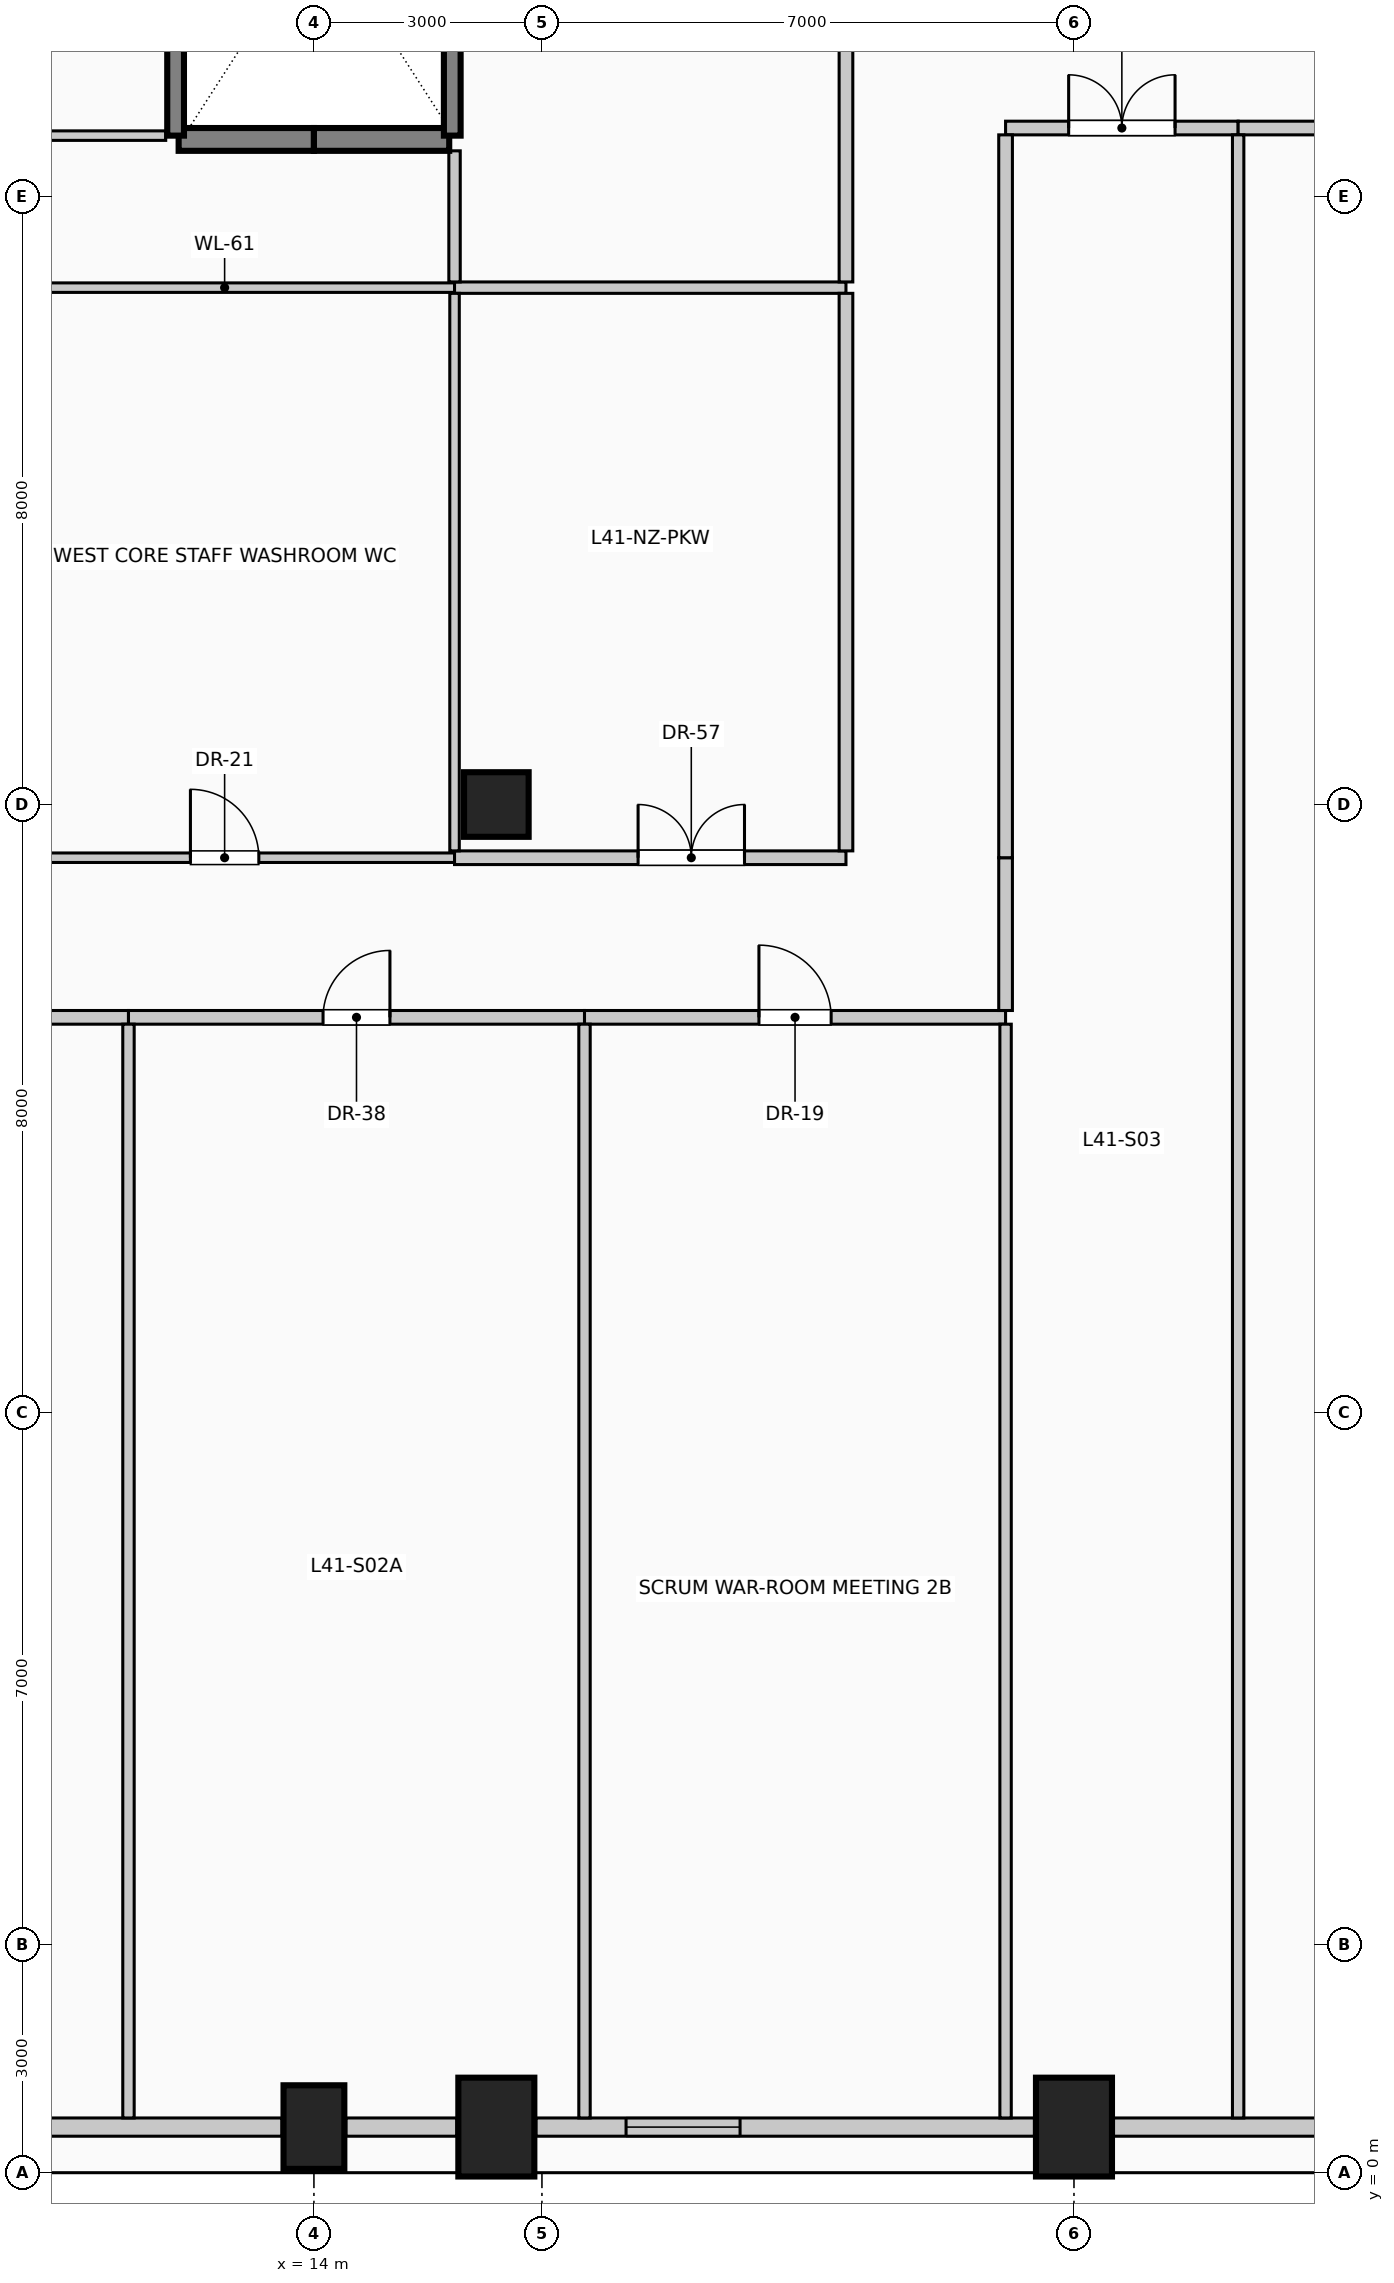
"""IFC4 building model, lengths in metres.
Left out: names, types, materials, properties, quantities, classifications, styles, units other than length and angle.
Written with IfcOpenShell. Run it as: python <this file> out.ifc"""

import sys

from ifc_helpers import new_model, si_unit, direction, frame, frame_2d, origin, origin_2d, place, context, subcontext, project, spatial, rectangle, circle, extrude, element, fill, save


model = new_model("IFC4")
c1 = context("Model", 3, precision=1e-05, world=origin(), true_north=direction((0.0, 1.0)))
c2 = subcontext(c1, "Body", "Model", "MODEL_VIEW")
j1 = project(units=[si_unit("LENGTHUNIT", "METRE"), si_unit("PLANEANGLEUNIT", "RADIAN")], contexts=[c1])
p1 = place(None, origin())
s1 = spatial("IfcSite", under=j1, at=p1, CompositionType="ELEMENT")
p2 = place(p1, origin())
s2 = spatial("IfcBuilding", under=s1, at=p2, CompositionType="ELEMENT")
p3 = place(p2, frame((0.0, 0.0, 170.6)))
s3 = spatial("IfcBuildingStorey", under=s2, at=p3, CompositionType="ELEMENT", Elevation=170.6)
p4 = place(p3, frame((14.0, 0.6, 0.0), z_axis=(0.0, 0.0, 1.0), x_axis=(1.0, 0.0, 0.0)))
e1 = element("IfcColumn", 1, at=p4, inside=s3, PredefinedType="COLUMN", context=c2, shape_type="SweptSolid", body=[
    extrude(rectangle(XDim=0.8, YDim=1.1, at=origin_2d()), origin(), (0.0, 0.0, 1.0), 4.0),
])
for number, where, z_axis, x_axis in (
    (2, (16.4, 0.6, 0.0), (0.0, 0.0, 1.0), (1.0, 0.0, 0.0)),
    (3, (24.0, 0.6, 0.0), (0.0, 0.0, 1.0), (1.0, 0.0, 0.0)),
):
    element("IfcColumn", number, at=place(p3, frame(where, z_axis=z_axis, x_axis=x_axis)), inside=s3, PredefinedType="COLUMN", context=c2, shape_type="SweptSolid", body=[
        extrude(rectangle(XDim=1.0, YDim=1.3, at=origin_2d()), origin(), (0.0, 0.0, 1.0), 4.0),
    ])
p5 = place(p3, frame((16.4, 18.0, 0.0), z_axis=(0.0, 0.0, 1.0), x_axis=(1.0, 0.0, 0.0)))
e4 = element("IfcColumn", 4, at=p5, inside=s3, PredefinedType="COLUMN", context=c2, shape_type="SweptSolid", body=[
    extrude(circle(Radius=0.425, at=origin_2d()), origin(), (0.0, 0.0, 1.0), 4.0),
])
p6 = place(p3, frame((13.58, 0.6, 0.0), z_axis=(0.0, 0.0, 1.0), x_axis=(-1.0, 0.0, 0.0)))
e5 = element("IfcWall", 5, at=p6, inside=s3, PredefinedType="SOLIDWALL", context=c2, shape_type="SweptSolid", body=[
    extrude(rectangle(XDim=4.66, YDim=0.24, at=frame_2d((2.33, 0.0))), origin(), (0.0, 0.0, 1.0), 2.975),
])
p7 = place(p3, frame((15.88, 0.6, 0.0), z_axis=(0.0, 0.0, 1.0), x_axis=(-1.0, 0.0, 0.0)))
e6 = element("IfcWall", 6, at=p7, inside=s3, PredefinedType="SOLIDWALL", context=c2, shape_type="SweptSolid", body=[
    extrude(rectangle(XDim=1.46, YDim=0.24, at=frame_2d((0.73, 0.0))), origin(), (0.0, 0.0, 1.0), 2.975),
])
p8 = place(p3, frame((23.48, 0.6, 0.0), z_axis=(0.0, 0.0, 1.0), x_axis=(-1.0, 0.0, 0.0)))
e7 = element("IfcWall", 7, at=p8, inside=s3, PredefinedType="SOLIDWALL", context=c2, shape_type="SweptSolid", body=[
    extrude(rectangle(XDim=6.56, YDim=0.24, at=frame_2d((3.28, 0.0))), origin(), (0.0, 0.0, 1.0), 2.975),
])
p9 = place(p8, frame((3.873, 0.0, 0.42)))
e8 = element("IfcOpeningElement", 8, at=p9, cuts=e7, PredefinedType="OPENING", context=c2, shape_type="SweptSolid", body=[
    extrude(rectangle(XDim=1.5, YDim=2.2, at=frame_2d((0.75, 1.1))), frame((0.0, 0.13, 0.0), z_axis=(0.0, -1.0, 0.0), x_axis=(1.0, 0.0, 0.0)), (0.0, 0.0, 1.0), 0.26),
])
p10 = place(p3, frame((28.58, 0.6, 0.0), z_axis=(0.0, 0.0, 1.0), x_axis=(-1.0, 0.0, 0.0)))
e9 = element("IfcWall", 9, at=p10, inside=s3, PredefinedType="SOLIDWALL", context=c2, shape_type="SweptSolid", body=[
    extrude(rectangle(XDim=4.06, YDim=0.24, at=frame_2d((2.03, 0.0))), origin(), (0.0, 0.0, 1.0), 2.975),
])
for number, where, z_axis, x_axis in (
    (10, (14.0, 26.75, 0.0), (0.0, 0.0, 1.0), (-1.0, 0.0, 0.0)),
    (11, (15.78, 26.75, 0.0), (0.0, 0.0, 1.0), (-1.0, 0.0, 0.0)),
):
    element("IfcWall", number, at=place(p3, frame(where, z_axis=z_axis, x_axis=x_axis)), inside=s3, PredefinedType="SOLIDWALL", context=c2, shape_type="SweptSolid", body=[
        extrude(rectangle(XDim=1.78, YDim=0.3, at=frame_2d((0.89, 0.0))), origin(), (0.0, 0.0, 1.0), 4.0),
    ])
for number, where, z_axis, x_axis in (
    (12, (12.18, 26.8, 0.0), (0.0, 0.0, 1.0), (0.0, 1.0, 0.0)),
    (13, (15.82, 26.8, 0.0), (0.0, 0.0, 1.0), (0.0, 1.0, 0.0)),
):
    element("IfcWall", number, at=place(p3, frame(where, z_axis=z_axis, x_axis=x_axis)), inside=s3, PredefinedType="SOLIDWALL", context=c2, shape_type="SweptSolid", body=[
        extrude(rectangle(XDim=5.45, YDim=0.22, at=frame_2d((2.725, 0.0))), origin(), (0.0, 0.0, 1.0), 4.0),
    ])
p11 = place(p3, frame((0.72, 15.2, 0.0), z_axis=(0.0, 0.0, 1.0), x_axis=(1.0, 0.0, 0.0)))
e14 = element("IfcWall", 14, at=p11, inside=s3, PredefinedType="PARTITIONING", context=c2, shape_type="SweptSolid", body=[
    extrude(rectangle(XDim=10.84, YDim=0.18, at=frame_2d((5.42, 0.0))), origin(), (0.0, 0.0, 1.0), 3.725),
])
p12 = place(p11, frame((4.945, 0.0, 0.0)))
e15 = element("IfcOpeningElement", 15, at=p12, cuts=e14, PredefinedType="OPENING", context=c2, shape_type="SweptSolid", body=[
    extrude(rectangle(XDim=0.95, YDim=2.15, at=frame_2d((0.475, 1.075))), frame((0.0, 0.1, 0.0), z_axis=(0.0, -1.0, 0.0), x_axis=(1.0, 0.0, 0.0)), (0.0, 0.0, 1.0), 0.2),
])
p13 = place(p3, frame((11.56, 15.2, 0.0), z_axis=(0.0, 0.0, 1.0), x_axis=(1.0, 0.0, 0.0)))
e16 = element("IfcWall", 16, at=p13, inside=s3, PredefinedType="PARTITIONING", context=c2, shape_type="SweptSolid", body=[
    extrude(rectangle(XDim=6.0, YDim=0.18, at=frame_2d((3.0, 0.0))), origin(), (0.0, 0.0, 1.0), 3.725),
])
p14 = place(p13, frame((2.56, 0.0, 0.0)))
e17 = element("IfcOpeningElement", 17, at=p14, cuts=e16, PredefinedType="OPENING", context=c2, shape_type="SweptSolid", body=[
    extrude(rectangle(XDim=0.88, YDim=2.1, at=frame_2d((0.44, 1.05))), frame((0.0, 0.1, 0.0), z_axis=(0.0, -1.0, 0.0), x_axis=(1.0, 0.0, 0.0)), (0.0, 0.0, 1.0), 0.2),
])
p15 = place(p3, frame((17.56, 15.2, 0.0), z_axis=(0.0, 0.0, 1.0), x_axis=(1.0, 0.0, 0.0)))
e18 = element("IfcWall", 18, at=p15, inside=s3, PredefinedType="PARTITIONING", context=c2, shape_type="SweptSolid", body=[
    extrude(rectangle(XDim=5.54, YDim=0.18, at=frame_2d((2.77, 0.0))), origin(), (0.0, 0.0, 1.0), 3.725),
])
p16 = place(p15, frame((2.295, 0.0, 0.0)))
e19 = element("IfcOpeningElement", 19, at=p16, cuts=e18, PredefinedType="OPENING", context=c2, shape_type="SweptSolid", body=[
    extrude(rectangle(XDim=0.95, YDim=2.15, at=frame_2d((0.475, 1.075))), frame((0.0, 0.1, 0.0), z_axis=(0.0, -1.0, 0.0), x_axis=(1.0, 0.0, 0.0)), (0.0, 0.0, 1.0), 0.2),
])
p17 = place(p3, frame((9.8, 17.3, 0.0), z_axis=(0.0, 0.0, 1.0), x_axis=(1.0, 0.0, 0.0)))
e20 = element("IfcWall", 20, at=p17, inside=s3, PredefinedType="PARTITIONING", context=c2, shape_type="SweptSolid", body=[
    extrude(rectangle(XDim=6.05, YDim=0.125, at=frame_2d((3.025, 0.0))), origin(), (0.0, 0.0, 1.0), 3.725),
])
p18 = place(p17, frame((2.575, 0.0, 0.0)))
e21 = element("IfcOpeningElement", 21, at=p18, cuts=e20, PredefinedType="OPENING", context=c2, shape_type="SweptSolid", body=[
    extrude(rectangle(XDim=0.9, YDim=2.1, at=frame_2d((0.45, 1.05))), frame((0.0, 0.073, 0.0), z_axis=(0.0, -1.0, 0.0), x_axis=(1.0, 0.0, 0.0)), (0.0, 0.0, 1.0), 0.145),
])
p19 = place(p3, frame((15.85, 17.3, 0.0), z_axis=(0.0, 0.0, 1.0), x_axis=(1.0, 0.0, 0.0)))
e22 = element("IfcWall", 22, at=p19, inside=s3, PredefinedType="PARTITIONING", context=c2, shape_type="SweptSolid", body=[
    extrude(rectangle(XDim=5.15, YDim=0.18, at=frame_2d((2.575, 0.0))), origin(), (0.0, 0.0, 1.0), 3.725),
])
p20 = place(p19, frame((2.415, 0.0, 0.0)))
e23 = element("IfcOpeningElement", 23, at=p20, cuts=e22, PredefinedType="OPENING", context=c2, shape_type="SweptSolid", body=[
    extrude(rectangle(XDim=1.4, YDim=2.2, at=frame_2d((0.7, 1.1))), frame((0.0, 0.1, 0.0), z_axis=(0.0, -1.0, 0.0), x_axis=(1.0, 0.0, 0.0)), (0.0, 0.0, 1.0), 0.2),
])
p21 = place(p3, frame((9.8, 24.8, 0.0), z_axis=(0.0, 0.0, 1.0), x_axis=(1.0, 0.0, 0.0)))
e24 = element("IfcWall", 24, at=p21, inside=s3, PredefinedType="PARTITIONING", context=c2, shape_type="SweptSolid", body=[
    extrude(rectangle(XDim=6.05, YDim=0.125, at=frame_2d((3.025, 0.0))), origin(), (0.0, 0.0, 1.0), 3.725),
])
p22 = place(p3, frame((15.85, 24.8, 0.0), z_axis=(0.0, 0.0, 1.0), x_axis=(1.0, 0.0, 0.0)))
e25 = element("IfcWall", 25, at=p22, inside=s3, PredefinedType="PARTITIONING", context=c2, shape_type="SweptSolid", body=[
    extrude(rectangle(XDim=5.15, YDim=0.15, at=frame_2d((2.575, 0.0))), origin(), (0.0, 0.0, 1.0), 3.725),
])
p23 = place(p3, frame((7.89, 26.8, 0.0), z_axis=(0.0, 0.0, 1.0), x_axis=(1.0, 0.0, 0.0)))
e26 = element("IfcWall", 26, at=p23, inside=s3, PredefinedType="PARTITIONING", context=c2, shape_type="SweptSolid", body=[
    extrude(rectangle(XDim=4.16, YDim=0.125, at=frame_2d((2.08, 0.0))), origin(), (0.0, 0.0, 1.0), 3.725),
])
p24 = place(p23, frame((1.62, 0.0, 0.0)))
e27 = element("IfcOpeningElement", 27, at=p24, cuts=e26, PredefinedType="OPENING", context=c2, shape_type="SweptSolid", body=[
    extrude(rectangle(XDim=0.92, YDim=2.1, at=frame_2d((0.46, 1.05))), frame((0.0, 0.073, 0.0), z_axis=(0.0, -1.0, 0.0), x_axis=(1.0, 0.0, 0.0)), (0.0, 0.0, 1.0), 0.145),
])
p25 = place(p3, frame((23.1, 26.9, 0.0), z_axis=(0.0, 0.0, 1.0), x_axis=(1.0, 0.0, 0.0)))
e28 = element("IfcWall", 28, at=p25, inside=s3, PredefinedType="PARTITIONING", context=c2, shape_type="SweptSolid", body=[
    extrude(rectangle(XDim=3.06, YDim=0.18, at=frame_2d((1.53, 0.0))), origin(), (0.0, 0.0, 1.0), 3.725),
])
p26 = place(p25, frame((0.83, 0.0, 0.0)))
e29 = element("IfcOpeningElement", 29, at=p26, cuts=e28, PredefinedType="OPENING", context=c2, shape_type="SweptSolid", body=[
    extrude(rectangle(XDim=1.4, YDim=2.2, at=frame_2d((0.7, 1.1))), frame((0.0, 0.1, 0.0), z_axis=(0.0, -1.0, 0.0), x_axis=(1.0, 0.0, 0.0)), (0.0, 0.0, 1.0), 0.2),
])
p27 = place(p3, frame((26.16, 26.9, 0.0), z_axis=(0.0, 0.0, 1.0), x_axis=(1.0, 0.0, 0.0)))
e30 = element("IfcWall", 30, at=p27, inside=s3, PredefinedType="PARTITIONING", context=c2, shape_type="SweptSolid", body=[
    extrude(rectangle(XDim=15.2, YDim=0.18, at=frame_2d((7.6, 0.0))), origin(), (0.0, 0.0, 1.0), 3.725),
])
p28 = place(p27, frame((6.9, 0.0, 0.0)))
e31 = element("IfcOpeningElement", 31, at=p28, cuts=e30, PredefinedType="OPENING", context=c2, shape_type="SweptSolid", body=[
    extrude(rectangle(XDim=1.4, YDim=2.2, at=frame_2d((0.7, 1.1))), frame((0.0, 0.1, 0.0), z_axis=(0.0, -1.0, 0.0), x_axis=(1.0, 0.0, 0.0)), (0.0, 0.0, 1.0), 0.2),
])
p29 = place(p3, frame((11.56, 0.72, 0.0), z_axis=(0.0, 0.0, 1.0), x_axis=(0.0, 1.0, 0.0)))
e32 = element("IfcWall", 32, at=p29, inside=s3, PredefinedType="PARTITIONING", context=c2, shape_type="SweptSolid", body=[
    extrude(rectangle(XDim=14.39, YDim=0.15, at=frame_2d((7.195, 0.0))), origin(), (0.0, 0.0, 1.0), 3.725),
])
p30 = place(p3, frame((15.85, 17.39, 0.0), z_axis=(0.0, 0.0, 1.0), x_axis=(0.0, 1.0, 0.0)))
e33 = element("IfcWall", 33, at=p30, inside=s3, PredefinedType="PARTITIONING", context=c2, shape_type="SweptSolid", body=[
    extrude(rectangle(XDim=7.335, YDim=0.125, at=frame_2d((3.667, 0.0))), origin(), (0.0, 0.0, 1.0), 3.725),
])
p31 = place(p3, frame((15.85, 24.875, 0.0), z_axis=(0.0, 0.0, 1.0), x_axis=(0.0, 1.0, 0.0)))
e34 = element("IfcWall", 34, at=p31, inside=s3, PredefinedType="PARTITIONING", context=c2, shape_type="SweptSolid", body=[
    extrude(rectangle(XDim=1.725, YDim=0.15, at=frame_2d((0.863, 0.0))), origin(), (0.0, 0.0, 1.0), 3.725),
])
p32 = place(p3, frame((17.56, 0.72, 0.0), z_axis=(0.0, 0.0, 1.0), x_axis=(0.0, 1.0, 0.0)))
e35 = element("IfcWall", 35, at=p32, inside=s3, PredefinedType="PARTITIONING", context=c2, shape_type="SweptSolid", body=[
    extrude(rectangle(XDim=14.39, YDim=0.15, at=frame_2d((7.195, 0.0))), origin(), (0.0, 0.0, 1.0), 3.725),
])
p33 = place(p3, frame((21.0, 17.39, 0.0), z_axis=(0.0, 0.0, 1.0), x_axis=(0.0, 1.0, 0.0)))
e36 = element("IfcWall", 36, at=p33, inside=s3, PredefinedType="PARTITIONING", context=c2, shape_type="SweptSolid", body=[
    extrude(rectangle(XDim=7.335, YDim=0.18, at=frame_2d((3.667, 0.0))), origin(), (0.0, 0.0, 1.0), 3.725),
])
p34 = place(p3, frame((21.0, 24.875, 0.0), z_axis=(0.0, 0.0, 1.0), x_axis=(0.0, 1.0, 0.0)))
e37 = element("IfcWall", 37, at=p34, inside=s3, PredefinedType="PARTITIONING", context=c2, shape_type="SweptSolid", body=[
    extrude(rectangle(XDim=7.385, YDim=0.18, at=frame_2d((3.692, 0.0))), origin(), (0.0, 0.0, 1.0), 3.725),
])
p35 = place(p3, frame((23.1, 0.72, 0.0), z_axis=(0.0, 0.0, 1.0), x_axis=(0.0, 1.0, 0.0)))
e38 = element("IfcWall", 38, at=p35, inside=s3, PredefinedType="PARTITIONING", context=c2, shape_type="SweptSolid", body=[
    extrude(rectangle(XDim=14.39, YDim=0.15, at=frame_2d((7.195, 0.0))), origin(), (0.0, 0.0, 1.0), 3.725),
])
p36 = place(p3, frame((23.1, 15.29, 0.0), z_axis=(0.0, 0.0, 1.0), x_axis=(0.0, 1.0, 0.0)))
e39 = element("IfcWall", 39, at=p36, inside=s3, PredefinedType="PARTITIONING", context=c2, shape_type="SweptSolid", body=[
    extrude(rectangle(XDim=2.01, YDim=0.18, at=frame_2d((1.005, 0.0))), origin(), (0.0, 0.0, 1.0), 3.725),
])
p37 = place(p3, frame((23.1, 17.3, 0.0), z_axis=(0.0, 0.0, 1.0), x_axis=(0.0, 1.0, 0.0)))
e40 = element("IfcWall", 40, at=p37, inside=s3, PredefinedType="PARTITIONING", context=c2, shape_type="SweptSolid", body=[
    extrude(rectangle(XDim=9.51, YDim=0.18, at=frame_2d((4.755, 0.0))), origin(), (0.0, 0.0, 1.0), 3.725),
])
p38 = place(p3, frame((26.16, 0.72, 0.0), z_axis=(0.0, 0.0, 1.0), x_axis=(0.0, 1.0, 0.0)))
e41 = element("IfcWall", 41, at=p38, inside=s3, PredefinedType="PARTITIONING", context=c2, shape_type="SweptSolid", body=[
    extrude(rectangle(XDim=26.09, YDim=0.15, at=frame_2d((13.045, 0.0))), origin(), (0.0, 0.0, 1.0), 3.725),
])
p39 = place(p9, origin())
e42 = element("IfcWindow", 42, at=p39, inside=s3, PartitioningType="SINGLE_PANEL", PredefinedType="WINDOW", context=c2, shape_type="SweptSolid", body=[
    extrude(rectangle(XDim=1.5, YDim=2.2, at=frame_2d((0.75, 1.1))), frame((0.0, 0.03, 0.0), z_axis=(0.0, -1.0, 0.0), x_axis=(1.0, 0.0, 0.0)), (0.0, 0.0, 1.0), 0.06),
])
fill(e8, e42)
p40 = place(p14, origin())
e43 = element("IfcDoor", 43, at=p40, inside=s3, OperationType="SINGLE_SWING_RIGHT", PredefinedType="DOOR", context=c2, shape_type="SweptSolid", body=[
    extrude(rectangle(XDim=0.88, YDim=2.1, at=frame_2d((0.44, 1.05))), frame((0.0, 0.025, 0.0), z_axis=(0.0, -1.0, 0.0), x_axis=(1.0, 0.0, 0.0)), (0.0, 0.0, 1.0), 0.05),
])
fill(e17, e43)
p41 = place(p16, origin())
e44 = element("IfcDoor", 44, at=p41, inside=s3, OperationType="SINGLE_SWING_LEFT", PredefinedType="DOOR", context=c2, shape_type="SweptSolid", body=[
    extrude(rectangle(XDim=0.95, YDim=2.15, at=frame_2d((0.475, 1.075))), frame((0.0, 0.025, 0.0), z_axis=(0.0, -1.0, 0.0), x_axis=(1.0, 0.0, 0.0)), (0.0, 0.0, 1.0), 0.05),
])
fill(e19, e44)
p42 = place(p18, origin())
e45 = element("IfcDoor", 45, at=p42, inside=s3, OperationType="SINGLE_SWING_LEFT", PredefinedType="DOOR", context=c2, shape_type="SweptSolid", body=[
    extrude(rectangle(XDim=0.9, YDim=2.1, at=frame_2d((0.45, 1.05))), frame((0.0, 0.025, 0.0), z_axis=(0.0, -1.0, 0.0), x_axis=(1.0, 0.0, 0.0)), (0.0, 0.0, 1.0), 0.05),
])
fill(e21, e45)
p43 = place(p20, origin())
e46 = element("IfcDoor", 46, at=p43, inside=s3, OperationType="DOUBLE_DOOR_SINGLE_SWING", PredefinedType="DOOR", context=c2, shape_type="SweptSolid", body=[
    extrude(rectangle(XDim=1.4, YDim=2.2, at=frame_2d((0.7, 1.1))), frame((0.0, 0.025, 0.0), z_axis=(0.0, -1.0, 0.0), x_axis=(1.0, 0.0, 0.0)), (0.0, 0.0, 1.0), 0.05),
])
fill(e23, e46)
p44 = place(p26, origin())
e47 = element("IfcDoor", 47, at=p44, inside=s3, OperationType="DOUBLE_DOOR_SINGLE_SWING", PredefinedType="DOOR", context=c2, shape_type="SweptSolid", body=[
    extrude(rectangle(XDim=1.4, YDim=2.2, at=frame_2d((0.7, 1.1))), frame((0.0, 0.025, 0.0), z_axis=(0.0, -1.0, 0.0), x_axis=(1.0, 0.0, 0.0)), (0.0, 0.0, 1.0), 0.05),
])
fill(e29, e47)
save(model, sys.argv[1])
